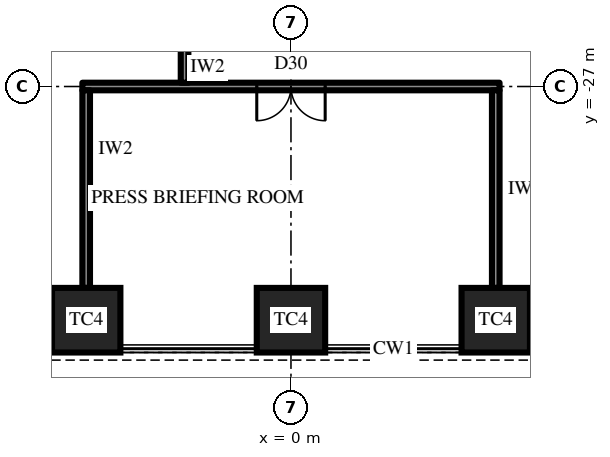
"""IFC4 building model, lengths in metres.
Left out: names, types, materials, properties, quantities, classifications, styles, units other than length and angle.
Written with IfcOpenShell. Run it as: python <this file> out.ifc"""

import sys

from ifc_helpers import new_model, si_unit, direction, frame, frame_2d, origin, origin_2d, place, context, subcontext, project, spatial, rectangle, extrude, element, fill, save


model = new_model("IFC4")
c1 = context("Model", 3, precision=1e-05, world=origin(), true_north=direction((0.0, 1.0)))
c2 = subcontext(c1, "Body", "Model", "MODEL_VIEW")
j1 = project(units=[si_unit("LENGTHUNIT", "METRE"), si_unit("PLANEANGLEUNIT", "RADIAN")], contexts=[c1])
p1 = place(None, origin())
s1 = spatial("IfcSite", under=j1, at=p1, CompositionType="ELEMENT")
p2 = place(p1, origin())
s2 = spatial("IfcBuilding", under=s1, at=p2, CompositionType="ELEMENT")
p3 = place(p2, frame((0.0, 0.0, 99.1)))
s3 = spatial("IfcBuildingStorey", under=s2, at=p3, CompositionType="ELEMENT", Elevation=99.1)
for number, where, z_axis, x_axis in (
    (1, (-5.389, -33.15, 0.0), (0.0, 0.0, 1.0), (1.0, 0.0, 0.0)),
    (2, (0.0, -33.15, 0.0), (0.0, 0.0, 1.0), (1.0, 0.0, 0.0)),
    (3, (5.389, -33.15, 0.0), (0.0, 0.0, 1.0), (1.0, 0.0, 0.0)),
):
    element("IfcColumn", number, at=place(p3, frame(where, z_axis=z_axis, x_axis=x_axis)), inside=s3, PredefinedType="COLUMN", context=c2, shape_type="SweptSolid", body=[
        extrude(rectangle(XDim=1.8, YDim=1.7, at=origin_2d()), origin(), (0.0, 0.0, 1.0), 4.2),
    ])
p4 = place(p3, frame((-5.489, -27.0, 0.0), z_axis=(0.0, 0.0, 1.0), x_axis=(1.0, 0.0, 0.0)))
e4 = element("IfcWall", 4, at=p4, inside=s3, PredefinedType="PARTITIONING", context=c2, shape_type="SweptSolid", body=[
    extrude(rectangle(XDim=10.977, YDim=0.2, at=frame_2d((5.489, 0.0))), origin(), (0.0, 0.0, 1.0), 4.0),
])
p5 = place(p4, frame((4.589, 0.0, 0.0)))
e5 = element("IfcOpeningElement", 5, at=p5, cuts=e4, PredefinedType="OPENING", context=c2, shape_type="SweptSolid", body=[
    extrude(rectangle(XDim=1.8, YDim=2.4, at=frame_2d((0.9, 1.2))), frame((0.0, 0.11, 0.0), z_axis=(0.0, -1.0, 0.0), x_axis=(1.0, 0.0, 0.0)), (0.0, 0.0, 1.0), 0.22),
])
for number, where, z_axis, x_axis in (
    (6, (-5.389, -27.1, 0.0), (0.0, 0.0, 1.0), (0.0, -1.0, 0.0)),
    (7, (5.389, -27.1, 0.0), (0.0, 0.0, 1.0), (0.0, -1.0, 0.0)),
):
    element("IfcWall", number, at=place(p3, frame(where, z_axis=z_axis, x_axis=x_axis)), inside=s3, PredefinedType="PARTITIONING", context=c2, shape_type="SweptSolid", body=[
        extrude(rectangle(XDim=5.2, YDim=0.2, at=frame_2d((2.6, 0.0))), origin(), (0.0, 0.0, 1.0), 2.944),
    ])
p6 = place(p3, frame((-2.8, -18.2, 0.0), z_axis=(0.0, 0.0, 1.0), x_axis=(0.0, -1.0, 0.0)))
e8 = element("IfcWall", 8, at=p6, inside=s3, PredefinedType="PARTITIONING", context=c2, shape_type="SweptSolid", body=[
    extrude(rectangle(XDim=8.7, YDim=0.2, at=frame_2d((4.35, 0.0))), origin(), (0.0, 0.0, 1.0), 2.944),
])
p7 = place(p6, frame((0.37, 0.0, 0.0)))
e9 = element("IfcOpeningElement", 9, at=p7, cuts=e8, PredefinedType="OPENING", context=c2, shape_type="SweptSolid", body=[
    extrude(rectangle(XDim=1.0, YDim=2.2, at=frame_2d((0.5, 1.1))), frame((0.0, 0.11, 0.0), z_axis=(0.0, -1.0, 0.0), x_axis=(1.0, 0.0, 0.0)), (0.0, 0.0, 1.0), 0.22),
])
p8 = place(p5, frame((1.8, 0.0, 0.0), z_axis=(0.0, 0.0, 1.0), x_axis=(-1.0, 0.0, 0.0)))
e10 = element("IfcDoor", 10, at=p8, inside=s3, OperationType="DOUBLE_DOOR_SINGLE_SWING", PredefinedType="DOOR", context=c2, shape_type="SweptSolid", body=[
    extrude(rectangle(XDim=1.8, YDim=2.4, at=frame_2d((0.9, 1.2))), frame((0.0, 0.025, 0.0), z_axis=(0.0, -1.0, 0.0), x_axis=(1.0, 0.0, 0.0)), (0.0, 0.0, 1.0), 0.05),
])
fill(e5, e10)
save(model, sys.argv[1])
